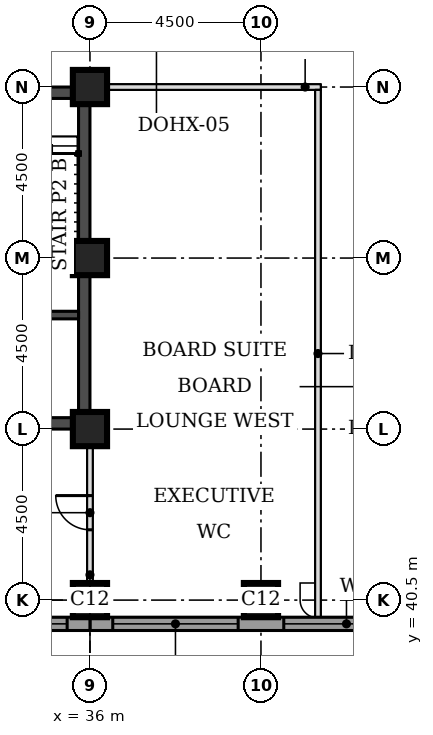
"""IFC4 building model, lengths in metres.
Left out: names, types, materials, properties, quantities, classifications, styles, units other than length and angle.
Written with IfcOpenShell. Run it as: python <this file> out.ifc"""

import sys

from ifc_helpers import new_model, si_unit, direction, frame, frame_2d, origin, origin_2d, place, context, subcontext, project, spatial, rectangle, extrude, element, fill, save


model = new_model("IFC4")
c1 = context("Model", 3, precision=1e-05, world=origin(), true_north=direction((0.0, 1.0)))
c2 = subcontext(c1, "Body", "Model", "MODEL_VIEW")
j1 = project(units=[si_unit("LENGTHUNIT", "METRE"), si_unit("PLANEANGLEUNIT", "RADIAN")], contexts=[c1])
p1 = place(None, origin())
s1 = spatial("IfcSite", under=j1, at=p1, CompositionType="ELEMENT")
p2 = place(p1, origin())
s2 = spatial("IfcBuilding", under=s1, at=p2, CompositionType="ELEMENT")
p3 = place(p2, frame((0.0, 0.0, 256.3)))
s3 = spatial("IfcBuildingStorey", under=s2, at=p3, CompositionType="ELEMENT", Elevation=256.3)
for number, where, z_axis, x_axis in (
    (1, (36.0, 40.5, 0.0), (0.0, 0.0, 1.0), (1.0, 0.0, 0.0)),
    (2, (40.5, 40.5, 0.0), (0.0, 0.0, 1.0), (1.0, 0.0, 0.0)),
    (3, (36.0, 45.0, 0.0), (0.0, 0.0, 1.0), (1.0, 0.0, 0.0)),
    (4, (36.0, 49.5, 0.0), (0.0, 0.0, 1.0), (1.0, 0.0, 0.0)),
    (5, (36.0, 54.0, 0.0), (0.0, 0.0, 1.0), (1.0, 0.0, 0.0)),
):
    element("IfcColumn", number, at=place(p3, frame(where, z_axis=z_axis, x_axis=x_axis)), inside=s3, PredefinedType="COLUMN", context=c2, shape_type="SweptSolid", body=[
        extrude(rectangle(XDim=0.9, YDim=0.9, at=origin_2d()), origin(), (0.0, 0.0, 1.0), 3.7),
    ])
p4 = place(p3, frame((27.3, 45.15, 0.0), z_axis=(0.0, 0.0, 1.0), x_axis=(1.0, 0.0, 0.0)))
e6 = element("IfcWall", 6, at=p4, inside=s3, PredefinedType="SHEAR", context=c2, shape_type="SweptSolid", body=[
    extrude(rectangle(XDim=8.4, YDim=0.3, at=frame_2d((4.2, 0.0))), origin(), (0.0, 0.0, 1.0), 3.7),
])
p5 = place(p4, frame((5.2, 0.0, 0.0)))
e7 = element("IfcOpeningElement", 7, at=p5, cuts=e6, PredefinedType="OPENING", context=c2, shape_type="SweptSolid", body=[
    extrude(rectangle(XDim=1.0, YDim=2.1, at=frame_2d((0.5, 1.05))), frame((0.0, 0.16, 0.0), z_axis=(0.0, -1.0, 0.0), x_axis=(1.0, 0.0, 0.0)), (0.0, 0.0, 1.0), 0.32),
])
p6 = place(p3, frame((27.3, 53.85, 0.0), z_axis=(0.0, 0.0, 1.0), x_axis=(1.0, 0.0, 0.0)))
e8 = element("IfcWall", 8, at=p6, inside=s3, PredefinedType="SHEAR", context=c2, shape_type="SweptSolid", body=[
    extrude(rectangle(XDim=8.4, YDim=0.3, at=frame_2d((4.2, 0.0))), origin(), (0.0, 0.0, 1.0), 3.7),
])
p7 = place(p6, frame((6.4, 0.0, 0.0)))
e9 = element("IfcOpeningElement", 9, at=p7, cuts=e8, PredefinedType="OPENING", context=c2, shape_type="SweptSolid", body=[
    extrude(rectangle(XDim=1.1, YDim=2.1, at=frame_2d((0.55, 1.05))), frame((0.0, 0.16, 0.0), z_axis=(0.0, -1.0, 0.0), x_axis=(1.0, 0.0, 0.0)), (0.0, 0.0, 1.0), 0.32),
])
p8 = place(p3, frame((35.85, 45.0, 0.0), z_axis=(0.0, 0.0, 1.0), x_axis=(0.0, 1.0, 0.0)))
e10 = element("IfcWall", 10, at=p8, inside=s3, PredefinedType="SHEAR", context=c2, shape_type="SweptSolid", body=[
    extrude(rectangle(XDim=9.0, YDim=0.3, at=frame_2d((4.5, 0.0))), origin(), (0.0, 0.0, 1.0), 3.7),
])
p9 = place(p3, frame((36.0, 39.875, 0.0), z_axis=(0.0, 0.0, 1.0), x_axis=(1.0, 0.0, 0.0)))
e11 = element("IfcWall", 11, at=p9, inside=s3, PredefinedType="STANDARD", context=c2, shape_type="SweptSolid", body=[
    extrude(rectangle(XDim=36.331, YDim=0.35, at=frame_2d((18.166, 0.0))), origin(), (0.0, 0.0, 1.0), 3.525),
])
p10 = place(p9, frame((0.6, 0.0, 0.9)))
e12 = element("IfcOpeningElement", 12, at=p10, cuts=e11, PredefinedType="OPENING", context=c2, shape_type="SweptSolid", body=[
    extrude(rectangle(XDim=3.3, YDim=1.9, at=frame_2d((1.65, 0.95))), frame((0.0, 0.185, 0.0), z_axis=(0.0, -1.0, 0.0), x_axis=(1.0, 0.0, 0.0)), (0.0, 0.0, 1.0), 0.37),
])
p11 = place(p9, frame((5.1, 0.0, 0.9)))
e13 = element("IfcOpeningElement", 13, at=p11, cuts=e11, PredefinedType="OPENING", context=c2, shape_type="SweptSolid", body=[
    extrude(rectangle(XDim=3.3, YDim=1.9, at=frame_2d((1.65, 0.95))), frame((0.0, 0.185, 0.0), z_axis=(0.0, -1.0, 0.0), x_axis=(1.0, 0.0, 0.0)), (0.0, 0.0, 1.0), 0.37),
])
p12 = place(p9, frame((9.6, 0.0, 0.9)))
e14 = element("IfcOpeningElement", 14, at=p12, cuts=e11, PredefinedType="OPENING", context=c2, shape_type="SweptSolid", body=[
    extrude(rectangle(XDim=3.3, YDim=1.9, at=frame_2d((1.65, 0.95))), frame((0.0, 0.185, 0.0), z_axis=(0.0, -1.0, 0.0), x_axis=(1.0, 0.0, 0.0)), (0.0, 0.0, 1.0), 0.37),
])
p13 = place(p9, frame((14.1, 0.0, 0.9)))
e15 = element("IfcOpeningElement", 15, at=p13, cuts=e11, PredefinedType="OPENING", context=c2, shape_type="SweptSolid", body=[
    extrude(rectangle(XDim=3.3, YDim=1.9, at=frame_2d((1.65, 0.95))), frame((0.0, 0.185, 0.0), z_axis=(0.0, -1.0, 0.0), x_axis=(1.0, 0.0, 0.0)), (0.0, 0.0, 1.0), 0.37),
])
p14 = place(p9, frame((18.6, 0.0, 0.9)))
e16 = element("IfcOpeningElement", 16, at=p14, cuts=e11, PredefinedType="OPENING", context=c2, shape_type="SweptSolid", body=[
    extrude(rectangle(XDim=3.3, YDim=1.9, at=frame_2d((1.65, 0.95))), frame((0.0, 0.185, 0.0), z_axis=(0.0, -1.0, 0.0), x_axis=(1.0, 0.0, 0.0)), (0.0, 0.0, 1.0), 0.37),
])
p15 = place(p9, frame((23.1, 0.0, 0.9)))
e17 = element("IfcOpeningElement", 17, at=p15, cuts=e11, PredefinedType="OPENING", context=c2, shape_type="SweptSolid", body=[
    extrude(rectangle(XDim=3.3, YDim=1.9, at=frame_2d((1.65, 0.95))), frame((0.0, 0.185, 0.0), z_axis=(0.0, -1.0, 0.0), x_axis=(1.0, 0.0, 0.0)), (0.0, 0.0, 1.0), 0.37),
])
p16 = place(p9, frame((27.6, 0.0, 0.9)))
e18 = element("IfcOpeningElement", 18, at=p16, cuts=e11, PredefinedType="OPENING", context=c2, shape_type="SweptSolid", body=[
    extrude(rectangle(XDim=3.3, YDim=1.9, at=frame_2d((1.65, 0.95))), frame((0.0, 0.185, 0.0), z_axis=(0.0, -1.0, 0.0), x_axis=(1.0, 0.0, 0.0)), (0.0, 0.0, 1.0), 0.37),
])
p17 = place(p9, frame((32.1, 0.0, 0.9)))
e19 = element("IfcOpeningElement", 19, at=p17, cuts=e11, PredefinedType="OPENING", context=c2, shape_type="SweptSolid", body=[
    extrude(rectangle(XDim=3.3, YDim=1.9, at=frame_2d((1.65, 0.95))), frame((0.0, 0.185, 0.0), z_axis=(0.0, -1.0, 0.0), x_axis=(1.0, 0.0, 0.0)), (0.0, 0.0, 1.0), 0.37),
])
p18 = place(p3, frame((17.669, 39.875, 0.0), z_axis=(0.0, 0.0, 1.0), x_axis=(1.0, 0.0, 0.0)))
e20 = element("IfcWall", 20, at=p18, inside=s3, PredefinedType="STANDARD", context=c2, shape_type="SweptSolid", body=[
    extrude(rectangle(XDim=18.331, YDim=0.35, at=frame_2d((9.166, 0.0))), origin(), (0.0, 0.0, 1.0), 3.525),
])
p19 = place(p18, frame((0.931, 0.0, 0.9)))
e21 = element("IfcOpeningElement", 21, at=p19, cuts=e20, PredefinedType="OPENING", context=c2, shape_type="SweptSolid", body=[
    extrude(rectangle(XDim=3.3, YDim=1.9, at=frame_2d((1.65, 0.95))), frame((0.0, 0.185, 0.0), z_axis=(0.0, -1.0, 0.0), x_axis=(1.0, 0.0, 0.0)), (0.0, 0.0, 1.0), 0.37),
])
p20 = place(p18, frame((5.431, 0.0, 0.9)))
e22 = element("IfcOpeningElement", 22, at=p20, cuts=e20, PredefinedType="OPENING", context=c2, shape_type="SweptSolid", body=[
    extrude(rectangle(XDim=3.3, YDim=1.9, at=frame_2d((1.65, 0.95))), frame((0.0, 0.185, 0.0), z_axis=(0.0, -1.0, 0.0), x_axis=(1.0, 0.0, 0.0)), (0.0, 0.0, 1.0), 0.37),
])
p21 = place(p18, frame((9.931, 0.0, 0.9)))
e23 = element("IfcOpeningElement", 23, at=p21, cuts=e20, PredefinedType="OPENING", context=c2, shape_type="SweptSolid", body=[
    extrude(rectangle(XDim=3.3, YDim=1.9, at=frame_2d((1.65, 0.95))), frame((0.0, 0.185, 0.0), z_axis=(0.0, -1.0, 0.0), x_axis=(1.0, 0.0, 0.0)), (0.0, 0.0, 1.0), 0.37),
])
p22 = place(p18, frame((14.431, 0.0, 0.9)))
e24 = element("IfcOpeningElement", 24, at=p22, cuts=e20, PredefinedType="OPENING", context=c2, shape_type="SweptSolid", body=[
    extrude(rectangle(XDim=3.3, YDim=1.9, at=frame_2d((1.65, 0.95))), frame((0.0, 0.185, 0.0), z_axis=(0.0, -1.0, 0.0), x_axis=(1.0, 0.0, 0.0)), (0.0, 0.0, 1.0), 0.37),
])
p23 = place(p3, frame((36.45, 54.0, 0.0), z_axis=(0.0, 0.0, 1.0), x_axis=(1.0, 0.0, 0.0)))
e25 = element("IfcWall", 25, at=p23, inside=s3, PredefinedType="PARTITIONING", context=c2, shape_type="SweptSolid", body=[
    extrude(rectangle(XDim=5.625, YDim=0.15, at=frame_2d((2.812, 0.0))), origin(), (0.0, 0.0, 1.0), 3.55),
])
p24 = place(p3, frame((42.0, 40.05, 0.0), z_axis=(0.0, 0.0, 1.0), x_axis=(0.0, 1.0, 0.0)))
e26 = element("IfcWall", 26, at=p24, inside=s3, PredefinedType="PARTITIONING", context=c2, shape_type="SweptSolid", body=[
    extrude(rectangle(XDim=13.875, YDim=0.15, at=frame_2d((6.938, 0.0))), origin(), (0.0, 0.0, 1.0), 3.55),
])
p25 = place(p3, frame((36.0, 40.95, 0.0), z_axis=(0.0, 0.0, 1.0), x_axis=(0.0, 1.0, 0.0)))
e27 = element("IfcWall", 27, at=p25, inside=s3, PredefinedType="PARTITIONING", context=c2, shape_type="SweptSolid", body=[
    extrude(rectangle(XDim=3.63, YDim=0.15, at=frame_2d((1.815, 0.0))), origin(), (0.0, 0.0, 1.0), 2.8),
])
p26 = place(p25, frame((1.4, 0.0, 0.0)))
e28 = element("IfcOpeningElement", 28, at=p26, cuts=e27, PredefinedType="OPENING", context=c2, shape_type="SweptSolid", body=[
    extrude(rectangle(XDim=0.9, YDim=2.1, at=frame_2d((0.45, 1.05))), frame((0.0, 0.085, 0.0), z_axis=(0.0, -1.0, 0.0), x_axis=(1.0, 0.0, 0.0)), (0.0, 0.0, 1.0), 0.17),
])
p27 = place(p3, frame((32.7, 48.0, 0.0), z_axis=(0.0, 0.0, 1.0), x_axis=(1.0, 0.0, 0.0)))
e29 = element("IfcWall", 29, at=p27, inside=s3, PredefinedType="SOLIDWALL", context=c2, shape_type="SweptSolid", body=[
    extrude(rectangle(XDim=3.0, YDim=0.2, at=frame_2d((1.5, 0.0))), origin(), (0.0, 0.0, 1.0), 3.55),
])
p28 = place(p10, origin())
e30 = element("IfcWindow", 30, at=p28, inside=s3, PartitioningType="SINGLE_PANEL", PredefinedType="WINDOW", context=c2, shape_type="SweptSolid", body=[
    extrude(rectangle(XDim=3.3, YDim=1.9, at=frame_2d((1.65, 0.95))), frame((0.0, 0.085, 0.0), z_axis=(0.0, -1.0, 0.0), x_axis=(1.0, 0.0, 0.0)), (0.0, 0.0, 1.0), 0.06),
])
fill(e12, e30)
p29 = place(p11, origin())
e31 = element("IfcWindow", 31, at=p29, inside=s3, PartitioningType="SINGLE_PANEL", PredefinedType="WINDOW", context=c2, shape_type="SweptSolid", body=[
    extrude(rectangle(XDim=3.3, YDim=1.9, at=frame_2d((1.65, 0.95))), frame((0.0, 0.085, 0.0), z_axis=(0.0, -1.0, 0.0), x_axis=(1.0, 0.0, 0.0)), (0.0, 0.0, 1.0), 0.06),
])
fill(e13, e31)
p30 = place(p22, origin())
e32 = element("IfcWindow", 32, at=p30, inside=s3, PartitioningType="SINGLE_PANEL", PredefinedType="WINDOW", context=c2, shape_type="SweptSolid", body=[
    extrude(rectangle(XDim=3.3, YDim=1.9, at=frame_2d((1.65, 0.95))), frame((0.0, 0.085, 0.0), z_axis=(0.0, -1.0, 0.0), x_axis=(1.0, 0.0, 0.0)), (0.0, 0.0, 1.0), 0.06),
])
fill(e24, e32)
p31 = place(p26, origin())
e33 = element("IfcDoor", 33, at=p31, inside=s3, OperationType="SINGLE_SWING_RIGHT", PredefinedType="DOOR", context=c2, shape_type="SweptSolid", body=[
    extrude(rectangle(XDim=0.9, YDim=2.1, at=frame_2d((0.45, 1.05))), frame((0.0, 0.025, 0.0), z_axis=(0.0, -1.0, 0.0), x_axis=(1.0, 0.0, 0.0)), (0.0, 0.0, 1.0), 0.05),
])
fill(e28, e33)
save(model, sys.argv[1])
